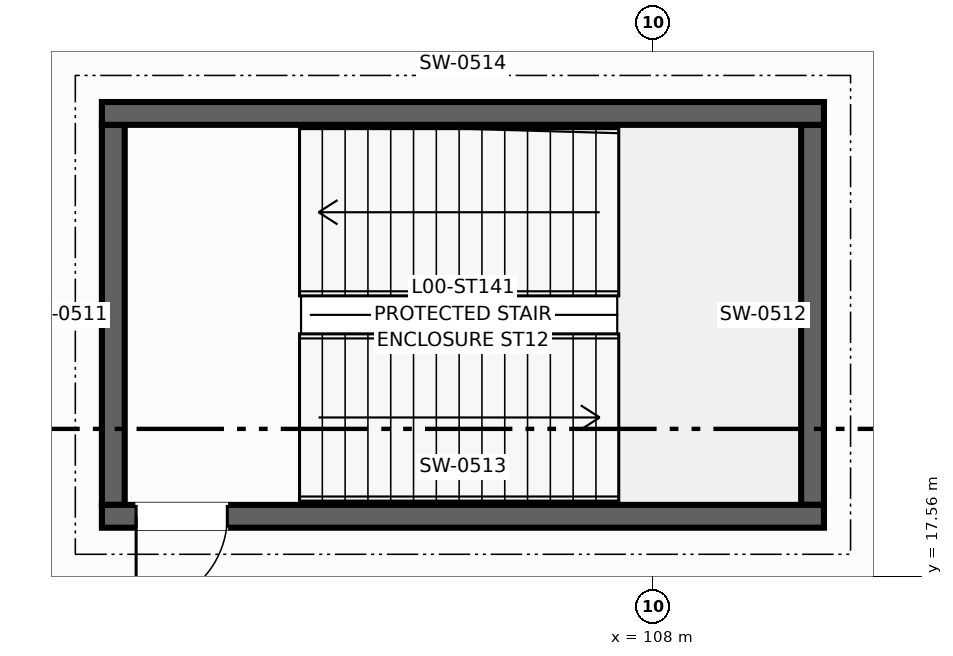
"""IFC4 building model, lengths in metres.
Left out: names, types, materials, properties, quantities, classifications, styles, units other than length and angle.
Written with IfcOpenShell. Run it as: python <this file> out.ifc"""

import sys

from ifc_helpers import new_model, si_unit, direction, frame, frame_2d, origin, place, context, subcontext, project, spatial, rectangle, extrude, element, fill, save


model = new_model("IFC4")
c1 = context("Model", 3, precision=1e-05, world=origin(), true_north=direction((0.0, 1.0)))
c2 = subcontext(c1, "Body", "Model", "MODEL_VIEW")
j1 = project(units=[si_unit("LENGTHUNIT", "METRE"), si_unit("PLANEANGLEUNIT", "RADIAN")], contexts=[c1])
p1 = place(None, origin())
s1 = spatial("IfcSite", under=j1, at=p1, CompositionType="ELEMENT")
p2 = place(p1, origin())
s2 = spatial("IfcBuilding", under=s1, at=p2, CompositionType="ELEMENT")
p3 = place(p2, origin())
s3 = spatial("IfcBuildingStorey", under=s2, at=p3, CompositionType="ELEMENT", Elevation=0.0)
for number, where, z_axis, x_axis in (
    (1, (100.9, 18.5, 0.0), (0.0, 0.0, 1.0), (0.0, 1.0, 0.0)),
    (2, (110.1, 18.5, 0.0), (0.0, 0.0, 1.0), (0.0, 1.0, 0.0)),
):
    element("IfcWall", number, at=place(p3, frame(where, z_axis=z_axis, x_axis=x_axis)), inside=s3, PredefinedType="SHEAR", context=c2, shape_type="SweptSolid", body=[
        extrude(rectangle(XDim=5.0, YDim=0.3, at=frame_2d((2.5, 0.0))), origin(), (0.0, 0.0, 1.0), 4.25),
    ])
p4 = place(p3, frame((100.75, 18.35, 0.0), z_axis=(0.0, 0.0, 1.0), x_axis=(1.0, 0.0, 0.0)))
e3 = element("IfcWall", 3, at=p4, inside=s3, PredefinedType="SHEAR", context=c2, shape_type="SweptSolid", body=[
    extrude(rectangle(XDim=9.5, YDim=0.3, at=frame_2d((4.75, 0.0))), origin(), (0.0, 0.0, 1.0), 4.25),
])
p5 = place(p4, frame((0.45, 0.0, 0.0)))
e4 = element("IfcOpeningElement", 4, at=p5, cuts=e3, PredefinedType="OPENING", context=c2, shape_type="SweptSolid", body=[
    extrude(rectangle(XDim=1.2, YDim=2.2, at=frame_2d((0.6, 1.1))), frame((0.0, 0.16, 0.0), z_axis=(0.0, -1.0, 0.0), x_axis=(1.0, 0.0, 0.0)), (0.0, 0.0, 1.0), 0.32),
])
p6 = place(p3, frame((100.75, 23.65, 0.0), z_axis=(0.0, 0.0, 1.0), x_axis=(1.0, 0.0, 0.0)))
e5 = element("IfcWall", 5, at=p6, inside=s3, PredefinedType="SHEAR", context=c2, shape_type="SweptSolid", body=[
    extrude(rectangle(XDim=9.5, YDim=0.3, at=frame_2d((4.75, 0.0))), origin(), (0.0, 0.0, 1.0), 4.25),
])
p7 = place(p5, frame((1.2, 0.0, 0.0), z_axis=(0.0, 0.0, 1.0), x_axis=(-1.0, 0.0, 0.0)))
e6 = element("IfcDoor", 6, at=p7, inside=s3, OperationType="SINGLE_SWING_LEFT", PredefinedType="DOOR", context=c2, shape_type="SweptSolid", body=[
    extrude(rectangle(XDim=1.2, YDim=2.2, at=frame_2d((0.6, 1.1))), frame((0.0, 0.025, 0.0), z_axis=(0.0, -1.0, 0.0), x_axis=(1.0, 0.0, 0.0)), (0.0, 0.0, 1.0), 0.05),
])
fill(e4, e6)
save(model, sys.argv[1])
